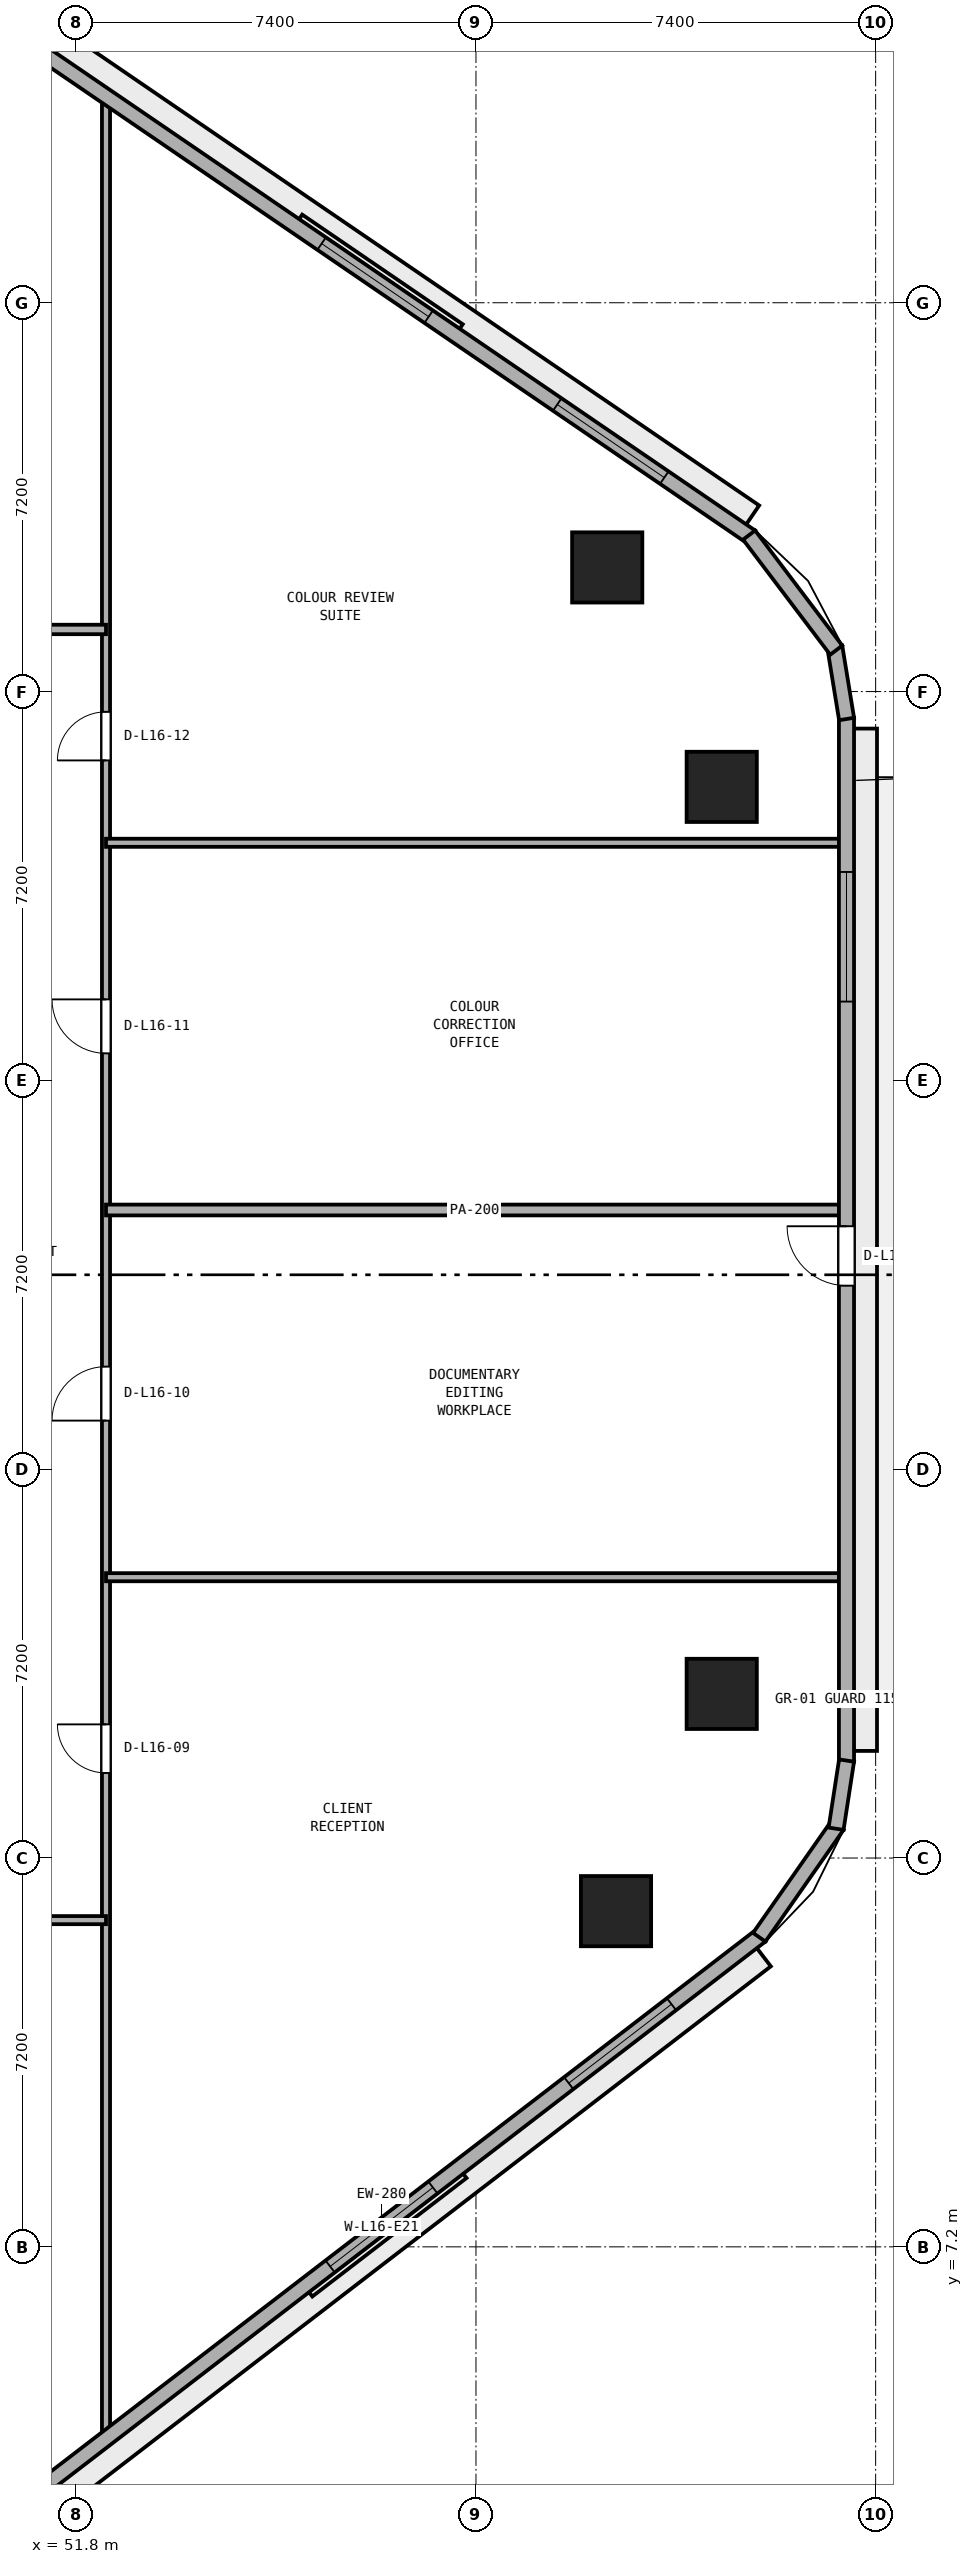
"""IFC4 building model, lengths in metres.
Left out: names, types, materials, properties, quantities, classifications, styles, units other than length and angle.
Written with IfcOpenShell. Run it as: python <this file> out.ifc"""

import sys

from ifc_helpers import new_model, si_unit, direction, frame, frame_2d, origin, origin_2d, place, context, subcontext, project, spatial, rectangle, extrude, element, fill, save


model = new_model("IFC4")
c1 = context("Model", 3, precision=1e-05, world=origin(), true_north=direction((0.0, 1.0)))
c2 = subcontext(c1, "Body", "Model", "MODEL_VIEW")
j1 = project(units=[si_unit("LENGTHUNIT", "METRE"), si_unit("PLANEANGLEUNIT", "RADIAN")], contexts=[c1])
p1 = place(None, origin())
s1 = spatial("IfcSite", under=j1, at=p1, CompositionType="ELEMENT")
p2 = place(p1, origin())
s2 = spatial("IfcBuilding", under=s1, at=p2, CompositionType="ELEMENT")
p3 = place(p2, frame((0.0, 0.0, 66.8)))
s3 = spatial("IfcBuildingStorey", under=s2, at=p3, CompositionType="ELEMENT", Elevation=66.8)
for number, where, z_axis, x_axis in (
    (1, (61.793, 13.416, 0.0), (0.0, 0.0, 1.0), (1.0, 0.0, 0.0)),
    (2, (63.75, 17.44, 0.0), (0.0, 0.0, 1.0), (1.0, 0.0, 0.0)),
    (3, (63.75, 34.235, 0.0), (0.0, 0.0, 1.0), (1.0, 0.0, 0.0)),
    (4, (61.63, 38.299, 0.0), (0.0, 0.0, 1.0), (1.0, 0.0, 0.0)),
):
    element("IfcColumn", number, at=place(p3, frame(where, z_axis=z_axis, x_axis=x_axis)), inside=s3, PredefinedType="COLUMN", context=c2, shape_type="SweptSolid", body=[
        extrude(rectangle(XDim=1.3, YDim=1.3, at=origin_2d()), origin(), (0.0, 0.0, 1.0), 3.8),
    ])
p4 = place(p3, frame((52.35, 3.611, 0.0), z_axis=(0.0, 0.0, 1.0), x_axis=(0.0, 1.0, 0.0)))
e5 = element("IfcWall", 5, at=p4, inside=s3, PredefinedType="PARTITIONING", context=c2, shape_type="SweptSolid", body=[
    extrude(rectangle(XDim=43.441, YDim=0.15, at=frame_2d((21.72, 0.0))), origin(), (0.0, 0.0, 1.0), 3.525),
])
p5 = place(p4, frame((12.364, 0.0, 0.0)))
e6 = element("IfcOpeningElement", 6, at=p5, cuts=e5, PredefinedType="OPENING", context=c2, shape_type="SweptSolid", body=[
    extrude(rectangle(XDim=0.9, YDim=2.1, at=frame_2d((0.45, 1.05))), frame((0.0, 0.085, 0.0), z_axis=(0.0, -1.0, 0.0), x_axis=(1.0, 0.0, 0.0)), (0.0, 0.0, 1.0), 0.17),
])
p6 = place(p4, frame((18.889, 0.0, 0.0)))
e7 = element("IfcOpeningElement", 7, at=p6, cuts=e5, PredefinedType="OPENING", context=c2, shape_type="SweptSolid", body=[
    extrude(rectangle(XDim=1.0, YDim=2.12, at=frame_2d((0.5, 1.06))), frame((0.0, 0.085, 0.0), z_axis=(0.0, -1.0, 0.0), x_axis=(1.0, 0.0, 0.0)), (0.0, 0.0, 1.0), 0.17),
])
p7 = place(p4, frame((25.689, 0.0, 0.0)))
e8 = element("IfcOpeningElement", 8, at=p7, cuts=e5, PredefinedType="OPENING", context=c2, shape_type="SweptSolid", body=[
    extrude(rectangle(XDim=1.0, YDim=2.12, at=frame_2d((0.5, 1.06))), frame((0.0, 0.085, 0.0), z_axis=(0.0, -1.0, 0.0), x_axis=(1.0, 0.0, 0.0)), (0.0, 0.0, 1.0), 0.17),
])
p8 = place(p4, frame((31.114, 0.0, 0.0)))
e9 = element("IfcOpeningElement", 9, at=p8, cuts=e5, PredefinedType="OPENING", context=c2, shape_type="SweptSolid", body=[
    extrude(rectangle(XDim=0.9, YDim=2.1, at=frame_2d((0.45, 1.05))), frame((0.0, 0.085, 0.0), z_axis=(0.0, -1.0, 0.0), x_axis=(1.0, 0.0, 0.0)), (0.0, 0.0, 1.0), 0.17),
])
p9 = place(p3, frame((21.65, 13.25, 0.0), z_axis=(0.0, 0.0, 1.0), x_axis=(1.0, 0.0, 0.0)))
e10 = element("IfcWall", 10, at=p9, inside=s3, PredefinedType="PARTITIONING", context=c2, shape_type="SweptSolid", body=[
    extrude(rectangle(XDim=30.7, YDim=0.15, at=frame_2d((15.35, 0.0))), origin(), (0.0, 0.0, 1.0), 3.525),
])
p10 = place(p9, frame((3.695, 0.0, 0.0)))
e11 = element("IfcOpeningElement", 11, at=p10, cuts=e10, PredefinedType="OPENING", context=c2, shape_type="SweptSolid", body=[
    extrude(rectangle(XDim=0.9, YDim=2.1, at=frame_2d((0.45, 1.05))), frame((0.0, 0.085, 0.0), z_axis=(0.0, -1.0, 0.0), x_axis=(1.0, 0.0, 0.0)), (0.0, 0.0, 1.0), 0.17),
])
p11 = place(p9, frame((11.95, 0.0, 0.0)))
e12 = element("IfcOpeningElement", 12, at=p11, cuts=e10, PredefinedType="OPENING", context=c2, shape_type="SweptSolid", body=[
    extrude(rectangle(XDim=0.9, YDim=2.1, at=frame_2d((0.45, 1.05))), frame((0.0, 0.085, 0.0), z_axis=(0.0, -1.0, 0.0), x_axis=(1.0, 0.0, 0.0)), (0.0, 0.0, 1.0), 0.17),
])
p12 = place(p9, frame((20.45, 0.0, 0.0)))
e13 = element("IfcOpeningElement", 13, at=p12, cuts=e10, PredefinedType="OPENING", context=c2, shape_type="SweptSolid", body=[
    extrude(rectangle(XDim=0.9, YDim=2.1, at=frame_2d((0.45, 1.05))), frame((0.0, 0.085, 0.0), z_axis=(0.0, -1.0, 0.0), x_axis=(1.0, 0.0, 0.0)), (0.0, 0.0, 1.0), 0.17),
])
p13 = place(p9, frame((27.305, 0.0, 0.0)))
e14 = element("IfcOpeningElement", 14, at=p13, cuts=e10, PredefinedType="OPENING", context=c2, shape_type="SweptSolid", body=[
    extrude(rectangle(XDim=0.9, YDim=2.1, at=frame_2d((0.45, 1.05))), frame((0.0, 0.085, 0.0), z_axis=(0.0, -1.0, 0.0), x_axis=(1.0, 0.0, 0.0)), (0.0, 0.0, 1.0), 0.17),
])
p14 = place(p3, frame((52.35, 19.6, 0.0), z_axis=(0.0, 0.0, 1.0), x_axis=(1.0, 0.0, 0.0)))
e15 = element("IfcWall", 15, at=p14, inside=s3, PredefinedType="PARTITIONING", context=c2, shape_type="SweptSolid", body=[
    extrude(rectangle(XDim=13.645, YDim=0.15, at=frame_2d((6.823, 0.0))), origin(), (0.0, 0.0, 1.0), 3.525),
])
p15 = place(p3, frame((52.35, 26.4, 0.0), z_axis=(0.0, 0.0, 1.0), x_axis=(1.0, 0.0, 0.0)))
e16 = element("IfcWall", 16, at=p15, inside=s3, PredefinedType="PARTITIONING", context=c2, shape_type="SweptSolid", body=[
    extrude(rectangle(XDim=13.645, YDim=0.2, at=frame_2d((6.823, 0.0))), origin(), (0.0, 0.0, 1.0), 3.525),
])
p16 = place(p3, frame((52.35, 33.2, 0.0), z_axis=(0.0, 0.0, 1.0), x_axis=(1.0, 0.0, 0.0)))
e17 = element("IfcWall", 17, at=p16, inside=s3, PredefinedType="PARTITIONING", context=c2, shape_type="SweptSolid", body=[
    extrude(rectangle(XDim=13.645, YDim=0.15, at=frame_2d((6.823, 0.0))), origin(), (0.0, 0.0, 1.0), 3.525),
])
p17 = place(p3, frame((21.65, 37.15, 0.0), z_axis=(0.0, 0.0, 1.0), x_axis=(1.0, 0.0, 0.0)))
e18 = element("IfcWall", 18, at=p17, inside=s3, PredefinedType="PARTITIONING", context=c2, shape_type="SweptSolid", body=[
    extrude(rectangle(XDim=30.7, YDim=0.175, at=frame_2d((15.35, 0.0))), origin(), (0.0, 0.0, 1.0), 3.525),
])
p18 = place(p17, frame((3.795, 0.0, 0.0)))
e19 = element("IfcOpeningElement", 19, at=p18, cuts=e18, PredefinedType="OPENING", context=c2, shape_type="SweptSolid", body=[
    extrude(rectangle(XDim=1.0, YDim=2.12, at=frame_2d((0.5, 1.06))), frame((0.0, 0.097, 0.0), z_axis=(0.0, -1.0, 0.0), x_axis=(1.0, 0.0, 0.0)), (0.0, 0.0, 1.0), 0.195),
])
p19 = place(p17, frame((18.905, 0.0, 0.0)))
e20 = element("IfcOpeningElement", 20, at=p19, cuts=e18, PredefinedType="OPENING", context=c2, shape_type="SweptSolid", body=[
    extrude(rectangle(XDim=1.0, YDim=2.12, at=frame_2d((0.5, 1.06))), frame((0.0, 0.097, 0.0), z_axis=(0.0, -1.0, 0.0), x_axis=(1.0, 0.0, 0.0)), (0.0, 0.0, 1.0), 0.195),
])
p20 = place(p3, frame((50.429, 2.172, 0.0), z_axis=(0.0, 0.0, 1.0), x_axis=(0.792937466367, 0.609303023488, 0.0)))
e21 = element("IfcWall", 21, at=p20, inside=s3, PredefinedType="STANDARD", context=c2, shape_type="SweptSolid", body=[
    extrude(rectangle(XDim=17.713, YDim=0.28, at=frame_2d((8.856, 0.0))), origin(), (0.0, 0.0, 1.0), 3.525),
])
p21 = place(p20, frame((7.656, 0.0, 0.9)))
e22 = element("IfcOpeningElement", 22, at=p21, cuts=e21, PredefinedType="OPENING", context=c2, shape_type="SweptSolid", body=[
    extrude(rectangle(XDim=2.4, YDim=1.75, at=frame_2d((1.2, 0.875))), frame((0.0, 0.15, 0.0), z_axis=(0.0, -1.0, 0.0), x_axis=(1.0, 0.0, 0.0)), (0.0, 0.0, 1.0), 0.3),
])
p22 = place(p20, frame((13.227, 0.0, 0.9)))
e23 = element("IfcOpeningElement", 23, at=p22, cuts=e21, PredefinedType="OPENING", context=c2, shape_type="SweptSolid", body=[
    extrude(rectangle(XDim=2.4, YDim=1.75, at=frame_2d((1.2, 0.875))), frame((0.0, 0.15, 0.0), z_axis=(0.0, -1.0, 0.0), x_axis=(1.0, 0.0, 0.0)), (0.0, 0.0, 1.0), 0.3),
])
p23 = place(p3, frame((66.06, 16.183, 0.0), z_axis=(0.0, 0.0, 1.0), x_axis=(0.0, 1.0, 0.0)))
e24 = element("IfcWall", 24, at=p23, inside=s3, PredefinedType="STANDARD", context=c2, shape_type="SweptSolid", body=[
    extrude(rectangle(XDim=19.331, YDim=0.28, at=frame_2d((9.666, 0.0))), origin(), (0.0, 0.0, 1.0), 3.525),
])
p24 = place(p23, frame((8.815, 0.0, 0.0)))
e25 = element("IfcOpeningElement", 25, at=p24, cuts=e24, PredefinedType="OPENING", context=c2, shape_type="SweptSolid", body=[
    extrude(rectangle(XDim=1.1, YDim=2.2, at=frame_2d((0.55, 1.1))), frame((0.0, 0.15, 0.0), z_axis=(0.0, -1.0, 0.0), x_axis=(1.0, 0.0, 0.0)), (0.0, 0.0, 1.0), 0.3),
])
p25 = place(p23, frame((14.076, 0.0, 0.9)))
e26 = element("IfcOpeningElement", 26, at=p25, cuts=e24, PredefinedType="OPENING", context=c2, shape_type="SweptSolid", body=[
    extrude(rectangle(XDim=2.4, YDim=1.75, at=frame_2d((1.2, 0.875))), frame((0.0, 0.15, 0.0), z_axis=(0.0, -1.0, 0.0), x_axis=(1.0, 0.0, 0.0)), (0.0, 0.0, 1.0), 0.3),
])
p26 = place(p3, frame((64.29, 38.867, 0.0), z_axis=(0.0, 0.0, 1.0), x_axis=(-0.825755550159, 0.564028165416, 0.0)))
e27 = element("IfcWall", 27, at=p26, inside=s3, PredefinedType="STANDARD", context=c2, shape_type="SweptSolid", body=[
    extrude(rectangle(XDim=16.848, YDim=0.28, at=frame_2d((8.424, 0.0))), origin(), (0.0, 0.0, 1.0), 3.525),
])
p27 = place(p26, frame((1.941, 0.0, 0.9)))
e28 = element("IfcOpeningElement", 28, at=p27, cuts=e27, PredefinedType="OPENING", context=c2, shape_type="SweptSolid", body=[
    extrude(rectangle(XDim=2.4, YDim=1.75, at=frame_2d((1.2, 0.875))), frame((0.0, 0.15, 0.0), z_axis=(0.0, -1.0, 0.0), x_axis=(1.0, 0.0, 0.0)), (0.0, 0.0, 1.0), 0.3),
])
p28 = place(p26, frame((7.224, 0.0, 0.9)))
e29 = element("IfcOpeningElement", 29, at=p28, cuts=e27, PredefinedType="OPENING", context=c2, shape_type="SweptSolid", body=[
    extrude(rectangle(XDim=2.4, YDim=1.75, at=frame_2d((1.2, 0.875))), frame((0.0, 0.15, 0.0), z_axis=(0.0, -1.0, 0.0), x_axis=(1.0, 0.0, 0.0)), (0.0, 0.0, 1.0), 0.3),
])
p29 = place(p3, frame((64.444, 12.933, 0.0), z_axis=(0.0, 0.0, 1.0), x_axis=(0.573176686443, 0.819431806875, 0.0)))
e30 = element("IfcWall", 30, at=p29, inside=s3, PredefinedType="STANDARD", context=c2, shape_type="SweptSolid", body=[
    extrude(rectangle(XDim=2.524, YDim=0.28, at=frame_2d((1.262, 0.0))), origin(), (0.0, 0.0, 1.0), 3.525),
])
p30 = place(p3, frame((65.867, 14.943, 0.0), z_axis=(0.0, 0.0, 1.0), x_axis=(0.152014078361, 0.988378328364, 0.0)))
e31 = element("IfcWall", 31, at=p30, inside=s3, PredefinedType="STANDARD", context=c2, shape_type="SweptSolid", body=[
    extrude(rectangle(XDim=1.277, YDim=0.28, at=frame_2d((0.638, 0.0))), origin(), (0.0, 0.0, 1.0), 3.525),
])
p31 = place(p3, frame((66.062, 35.492, 0.0), z_axis=(0.0, 0.0, 1.0), x_axis=(-0.161182073582, 0.986924687682, 0.0)))
e32 = element("IfcWall", 32, at=p31, inside=s3, PredefinedType="STANDARD", context=c2, shape_type="SweptSolid", body=[
    extrude(rectangle(XDim=1.354, YDim=0.28, at=frame_2d((0.677, 0.0))), origin(), (0.0, 0.0, 1.0), 3.525),
])
p32 = place(p3, frame((65.87, 36.767, 0.0), z_axis=(0.0, 0.0, 1.0), x_axis=(-0.603370463754, 0.797461023166, 0.0)))
e33 = element("IfcWall", 33, at=p32, inside=s3, PredefinedType="STANDARD", context=c2, shape_type="SweptSolid", body=[
    extrude(rectangle(XDim=2.673, YDim=0.28, at=frame_2d((1.336, 0.0))), origin(), (0.0, 0.0, 1.0), 3.525),
])
p33 = place(p5, origin())
e34 = element("IfcDoor", 34, at=p33, inside=s3, OperationType="SINGLE_SWING_RIGHT", PredefinedType="DOOR", context=c2, shape_type="SweptSolid", body=[
    extrude(rectangle(XDim=0.9, YDim=2.1, at=frame_2d((0.45, 1.05))), frame((0.0, 0.025, 0.0), z_axis=(0.0, -1.0, 0.0), x_axis=(1.0, 0.0, 0.0)), (0.0, 0.0, 1.0), 0.05),
])
fill(e6, e34)
p34 = place(p6, origin())
e35 = element("IfcDoor", 35, at=p34, inside=s3, OperationType="SINGLE_SWING_LEFT", PredefinedType="DOOR", context=c2, shape_type="SweptSolid", body=[
    extrude(rectangle(XDim=1.0, YDim=2.12, at=frame_2d((0.5, 1.06))), frame((0.0, 0.025, 0.0), z_axis=(0.0, -1.0, 0.0), x_axis=(1.0, 0.0, 0.0)), (0.0, 0.0, 1.0), 0.05),
])
fill(e7, e35)
p35 = place(p7, origin())
e36 = element("IfcDoor", 36, at=p35, inside=s3, OperationType="SINGLE_SWING_RIGHT", PredefinedType="DOOR", context=c2, shape_type="SweptSolid", body=[
    extrude(rectangle(XDim=1.0, YDim=2.12, at=frame_2d((0.5, 1.06))), frame((0.0, 0.025, 0.0), z_axis=(0.0, -1.0, 0.0), x_axis=(1.0, 0.0, 0.0)), (0.0, 0.0, 1.0), 0.05),
])
fill(e8, e36)
p36 = place(p8, origin())
e37 = element("IfcDoor", 37, at=p36, inside=s3, OperationType="SINGLE_SWING_LEFT", PredefinedType="DOOR", context=c2, shape_type="SweptSolid", body=[
    extrude(rectangle(XDim=0.9, YDim=2.1, at=frame_2d((0.45, 1.05))), frame((0.0, 0.025, 0.0), z_axis=(0.0, -1.0, 0.0), x_axis=(1.0, 0.0, 0.0)), (0.0, 0.0, 1.0), 0.05),
])
fill(e9, e37)
p37 = place(p21, origin())
e38 = element("IfcWindow", 38, at=p37, inside=s3, PartitioningType="SINGLE_PANEL", PredefinedType="WINDOW", context=c2, shape_type="SweptSolid", body=[
    extrude(rectangle(XDim=2.4, YDim=1.75, at=frame_2d((1.2, 0.875))), frame((0.0, 0.03, 0.0), z_axis=(0.0, -1.0, 0.0), x_axis=(1.0, 0.0, 0.0)), (0.0, 0.0, 1.0), 0.06),
])
fill(e22, e38)
p38 = place(p22, origin())
e39 = element("IfcWindow", 39, at=p38, inside=s3, PartitioningType="SINGLE_PANEL", PredefinedType="WINDOW", context=c2, shape_type="SweptSolid", body=[
    extrude(rectangle(XDim=2.4, YDim=1.75, at=frame_2d((1.2, 0.875))), frame((0.0, 0.03, 0.0), z_axis=(0.0, -1.0, 0.0), x_axis=(1.0, 0.0, 0.0)), (0.0, 0.0, 1.0), 0.06),
])
fill(e23, e39)
p39 = place(p24, origin())
e40 = element("IfcDoor", 40, at=p39, inside=s3, OperationType="SINGLE_SWING_RIGHT", PredefinedType="DOOR", context=c2, shape_type="SweptSolid", body=[
    extrude(rectangle(XDim=1.1, YDim=2.2, at=frame_2d((0.55, 1.1))), frame((0.0, 0.025, 0.0), z_axis=(0.0, -1.0, 0.0), x_axis=(1.0, 0.0, 0.0)), (0.0, 0.0, 1.0), 0.05),
])
fill(e25, e40)
p40 = place(p25, origin())
e41 = element("IfcWindow", 41, at=p40, inside=s3, PartitioningType="SINGLE_PANEL", PredefinedType="WINDOW", context=c2, shape_type="SweptSolid", body=[
    extrude(rectangle(XDim=2.4, YDim=1.75, at=frame_2d((1.2, 0.875))), frame((0.0, 0.03, 0.0), z_axis=(0.0, -1.0, 0.0), x_axis=(1.0, 0.0, 0.0)), (0.0, 0.0, 1.0), 0.06),
])
fill(e26, e41)
p41 = place(p27, origin())
e42 = element("IfcWindow", 42, at=p41, inside=s3, PartitioningType="SINGLE_PANEL", PredefinedType="WINDOW", context=c2, shape_type="SweptSolid", body=[
    extrude(rectangle(XDim=2.4, YDim=1.75, at=frame_2d((1.2, 0.875))), frame((0.0, 0.03, 0.0), z_axis=(0.0, -1.0, 0.0), x_axis=(1.0, 0.0, 0.0)), (0.0, 0.0, 1.0), 0.06),
])
fill(e28, e42)
p42 = place(p28, origin())
e43 = element("IfcWindow", 43, at=p42, inside=s3, PartitioningType="SINGLE_PANEL", PredefinedType="WINDOW", context=c2, shape_type="SweptSolid", body=[
    extrude(rectangle(XDim=2.4, YDim=1.75, at=frame_2d((1.2, 0.875))), frame((0.0, 0.03, 0.0), z_axis=(0.0, -1.0, 0.0), x_axis=(1.0, 0.0, 0.0)), (0.0, 0.0, 1.0), 0.06),
])
fill(e29, e43)
save(model, sys.argv[1])
